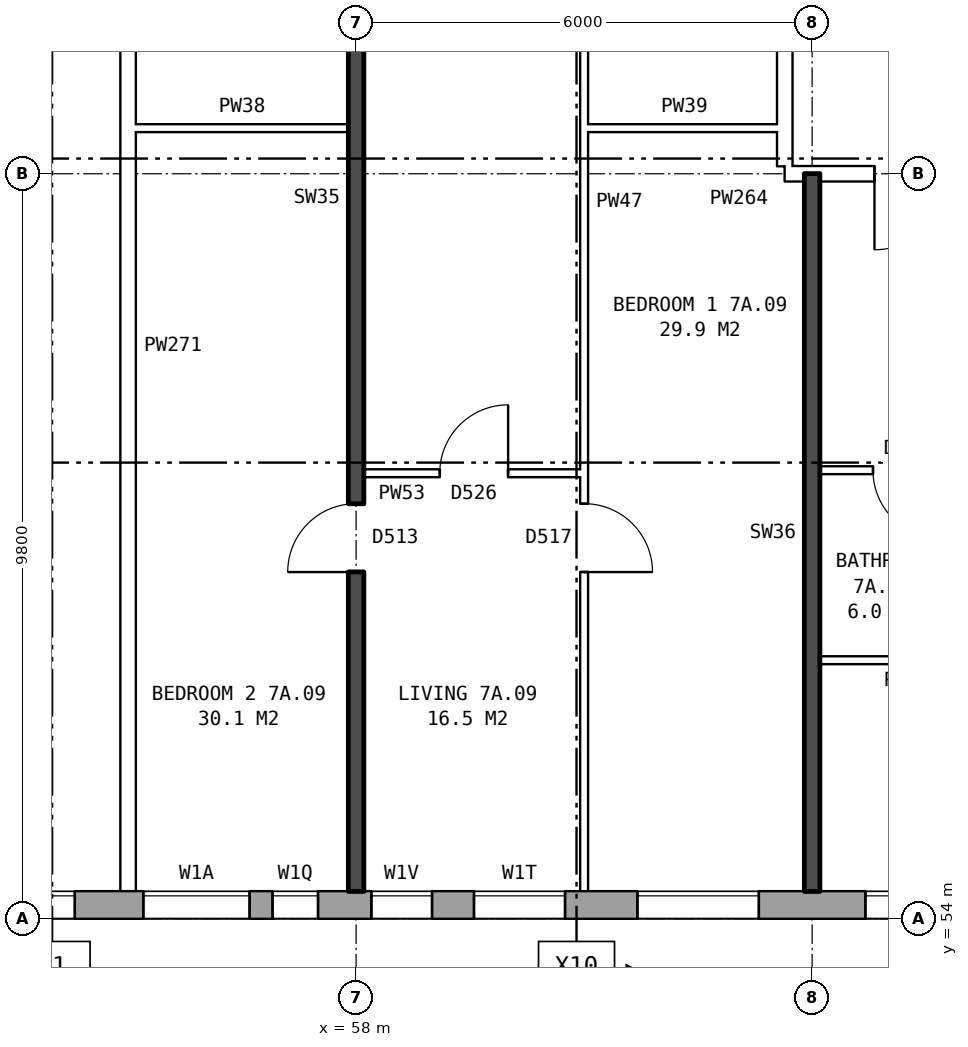
"""IFC4 building model, lengths in metres.
Left out: names, types, materials, properties, quantities, classifications, styles, units other than length and angle.
Written with IfcOpenShell. Run it as: python <this file> out.ifc"""

import sys

from ifc_helpers import new_model, si_unit, direction, frame, frame_2d, origin, place, context, subcontext, project, spatial, rectangle, extrude, element, fill, save


model = new_model("IFC4")
c1 = context("Model", 3, precision=1e-05, world=origin(), true_north=direction((0.0, 1.0)))
c2 = subcontext(c1, "Body", "Model", "MODEL_VIEW")
j1 = project(units=[si_unit("LENGTHUNIT", "METRE"), si_unit("PLANEANGLEUNIT", "RADIAN")], contexts=[c1])
p1 = place(None, origin())
s1 = spatial("IfcSite", under=j1, at=p1, CompositionType="ELEMENT")
p2 = place(p1, origin())
s2 = spatial("IfcBuilding", under=s1, at=p2, CompositionType="ELEMENT")
p3 = place(p2, frame((0.0, 0.0, 28.8)))
s3 = spatial("IfcBuildingStorey", under=s2, at=p3, CompositionType="ELEMENT", Elevation=28.8)
p4 = place(p3, frame((22.825, 54.18, 0.0), z_axis=(0.0, 0.0, 1.0), x_axis=(1.0, 0.0, 0.0)))
e1 = element("IfcWall", 1, at=p4, inside=s3, PredefinedType="STANDARD", context=c2, shape_type="SweptSolid", body=[
    extrude(rectangle(XDim=50.101, YDim=0.36, at=frame_2d((25.05, 0.0))), origin(), (0.0, 0.0, 1.0), 2.85),
])
p5 = place(p4, frame((2.875, 0.0, 0.8)))
e2 = element("IfcOpeningElement", 2, at=p5, cuts=e1, PredefinedType="OPENING", context=c2, shape_type="SweptSolid", body=[
    extrude(rectangle(XDim=1.6, YDim=1.8, at=frame_2d((0.8, 0.9))), frame((0.0, 0.19, 0.0), z_axis=(0.0, -1.0, 0.0), x_axis=(1.0, 0.0, 0.0)), (0.0, 0.0, 1.0), 0.38),
])
p6 = place(p4, frame((5.875, 0.0, 0.8)))
e3 = element("IfcOpeningElement", 3, at=p6, cuts=e1, PredefinedType="OPENING", context=c2, shape_type="SweptSolid", body=[
    extrude(rectangle(XDim=1.6, YDim=1.8, at=frame_2d((0.8, 0.9))), frame((0.0, 0.19, 0.0), z_axis=(0.0, -1.0, 0.0), x_axis=(1.0, 0.0, 0.0)), (0.0, 0.0, 1.0), 0.38),
])
p7 = place(p4, frame((8.875, 0.0, 0.8)))
e4 = element("IfcOpeningElement", 4, at=p7, cuts=e1, PredefinedType="OPENING", context=c2, shape_type="SweptSolid", body=[
    extrude(rectangle(XDim=1.6, YDim=1.8, at=frame_2d((0.8, 0.9))), frame((0.0, 0.19, 0.0), z_axis=(0.0, -1.0, 0.0), x_axis=(1.0, 0.0, 0.0)), (0.0, 0.0, 1.0), 0.38),
])
p8 = place(p4, frame((11.375, 0.0, 1.0)))
e5 = element("IfcOpeningElement", 5, at=p8, cuts=e1, PredefinedType="OPENING", context=c2, shape_type="SweptSolid", body=[
    extrude(rectangle(XDim=1.0, YDim=1.5, at=frame_2d((0.5, 0.75))), frame((0.0, 0.19, 0.0), z_axis=(0.0, -1.0, 0.0), x_axis=(1.0, 0.0, 0.0)), (0.0, 0.0, 1.0), 0.38),
])
p9 = place(p4, frame((12.675, 0.0, 1.6)))
e6 = element("IfcOpeningElement", 6, at=p9, cuts=e1, PredefinedType="OPENING", context=c2, shape_type="SweptSolid", body=[
    extrude(rectangle(XDim=0.6, YDim=0.9, at=frame_2d((0.3, 0.45))), frame((0.0, 0.19, 0.0), z_axis=(0.0, -1.0, 0.0), x_axis=(1.0, 0.0, 0.0)), (0.0, 0.0, 1.0), 0.38),
])
p10 = place(p4, frame((17.875, 0.0, 0.8)))
e7 = element("IfcOpeningElement", 7, at=p10, cuts=e1, PredefinedType="OPENING", context=c2, shape_type="SweptSolid", body=[
    extrude(rectangle(XDim=1.6, YDim=1.8, at=frame_2d((0.8, 0.9))), frame((0.0, 0.19, 0.0), z_axis=(0.0, -1.0, 0.0), x_axis=(1.0, 0.0, 0.0)), (0.0, 0.0, 1.0), 0.38),
])
p11 = place(p4, frame((20.875, 0.0, 0.8)))
e8 = element("IfcOpeningElement", 8, at=p11, cuts=e1, PredefinedType="OPENING", context=c2, shape_type="SweptSolid", body=[
    extrude(rectangle(XDim=1.6, YDim=1.8, at=frame_2d((0.8, 0.9))), frame((0.0, 0.19, 0.0), z_axis=(0.0, -1.0, 0.0), x_axis=(1.0, 0.0, 0.0)), (0.0, 0.0, 1.0), 0.38),
])
p12 = place(p4, frame((23.875, 0.0, 0.8)))
e9 = element("IfcOpeningElement", 9, at=p12, cuts=e1, PredefinedType="OPENING", context=c2, shape_type="SweptSolid", body=[
    extrude(rectangle(XDim=1.6, YDim=1.8, at=frame_2d((0.8, 0.9))), frame((0.0, 0.19, 0.0), z_axis=(0.0, -1.0, 0.0), x_axis=(1.0, 0.0, 0.0)), (0.0, 0.0, 1.0), 0.38),
])
p13 = place(p4, frame((26.875, 0.0, 0.8)))
e10 = element("IfcOpeningElement", 10, at=p13, cuts=e1, PredefinedType="OPENING", context=c2, shape_type="SweptSolid", body=[
    extrude(rectangle(XDim=1.6, YDim=1.8, at=frame_2d((0.8, 0.9))), frame((0.0, 0.19, 0.0), z_axis=(0.0, -1.0, 0.0), x_axis=(1.0, 0.0, 0.0)), (0.0, 0.0, 1.0), 0.38),
])
p14 = place(p4, frame((29.875, 0.0, 0.8)))
e11 = element("IfcOpeningElement", 11, at=p14, cuts=e1, PredefinedType="OPENING", context=c2, shape_type="SweptSolid", body=[
    extrude(rectangle(XDim=1.6, YDim=1.8, at=frame_2d((0.8, 0.9))), frame((0.0, 0.19, 0.0), z_axis=(0.0, -1.0, 0.0), x_axis=(1.0, 0.0, 0.0)), (0.0, 0.0, 1.0), 0.38),
])
p15 = place(p4, frame((32.375, 0.0, 0.8)))
e12 = element("IfcOpeningElement", 12, at=p15, cuts=e1, PredefinedType="OPENING", context=c2, shape_type="SweptSolid", body=[
    extrude(rectangle(XDim=1.4, YDim=1.8, at=frame_2d((0.7, 0.9))), frame((0.0, 0.19, 0.0), z_axis=(0.0, -1.0, 0.0), x_axis=(1.0, 0.0, 0.0)), (0.0, 0.0, 1.0), 0.38),
])
p16 = place(p4, frame((35.375, 0.0, 0.15)))
e13 = element("IfcOpeningElement", 13, at=p16, cuts=e1, PredefinedType="OPENING", context=c2, shape_type="SweptSolid", body=[
    extrude(rectangle(XDim=0.8, YDim=0.9, at=frame_2d((0.4, 0.45))), frame((0.0, 0.19, 0.0), z_axis=(0.0, -1.0, 0.0), x_axis=(1.0, 0.0, 0.0)), (0.0, 0.0, 1.0), 0.38),
])
p17 = place(p4, frame((38.875, 0.0, 0.8)))
e14 = element("IfcOpeningElement", 14, at=p17, cuts=e1, PredefinedType="OPENING", context=c2, shape_type="SweptSolid", body=[
    extrude(rectangle(XDim=1.6, YDim=1.8, at=frame_2d((0.8, 0.9))), frame((0.0, 0.19, 0.0), z_axis=(0.0, -1.0, 0.0), x_axis=(1.0, 0.0, 0.0)), (0.0, 0.0, 1.0), 0.38),
])
p18 = place(p4, frame((41.875, 0.0, 0.8)))
e15 = element("IfcOpeningElement", 15, at=p18, cuts=e1, PredefinedType="OPENING", context=c2, shape_type="SweptSolid", body=[
    extrude(rectangle(XDim=1.6, YDim=1.8, at=frame_2d((0.8, 0.9))), frame((0.0, 0.19, 0.0), z_axis=(0.0, -1.0, 0.0), x_axis=(1.0, 0.0, 0.0)), (0.0, 0.0, 1.0), 0.38),
])
p19 = place(p4, frame((44.875, 0.0, 0.8)))
e16 = element("IfcOpeningElement", 16, at=p19, cuts=e1, PredefinedType="OPENING", context=c2, shape_type="SweptSolid", body=[
    extrude(rectangle(XDim=1.6, YDim=1.8, at=frame_2d((0.8, 0.9))), frame((0.0, 0.19, 0.0), z_axis=(0.0, -1.0, 0.0), x_axis=(1.0, 0.0, 0.0)), (0.0, 0.0, 1.0), 0.38),
])
p20 = place(p4, frame((47.875, 0.0, 0.8)))
e17 = element("IfcOpeningElement", 17, at=p20, cuts=e1, PredefinedType="OPENING", context=c2, shape_type="SweptSolid", body=[
    extrude(rectangle(XDim=1.6, YDim=1.8, at=frame_2d((0.8, 0.9))), frame((0.0, 0.19, 0.0), z_axis=(0.0, -1.0, 0.0), x_axis=(1.0, 0.0, 0.0)), (0.0, 0.0, 1.0), 0.38),
])
p21 = place(p4, frame((14.825, 0.0, 0.8)))
e18 = element("IfcOpeningElement", 18, at=p21, cuts=e1, PredefinedType="OPENING", context=c2, shape_type="SweptSolid", body=[
    extrude(rectangle(XDim=0.6, YDim=0.9, at=frame_2d((0.3, 0.45))), frame((0.0, 0.19, 0.0), z_axis=(0.0, -1.0, 0.0), x_axis=(1.0, 0.0, 0.0)), (0.0, 0.0, 1.0), 0.38),
])
p22 = place(p4, frame((15.775, 0.0, 0.8)))
e19 = element("IfcOpeningElement", 19, at=p22, cuts=e1, PredefinedType="OPENING", context=c2, shape_type="SweptSolid", body=[
    extrude(rectangle(XDim=1.2, YDim=1.5, at=frame_2d((0.6, 0.75))), frame((0.0, 0.19, 0.0), z_axis=(0.0, -1.0, 0.0), x_axis=(1.0, 0.0, 0.0)), (0.0, 0.0, 1.0), 0.38),
])
p23 = place(p4, frame((34.075, 0.0, 0.8)))
e20 = element("IfcOpeningElement", 20, at=p23, cuts=e1, PredefinedType="OPENING", context=c2, shape_type="SweptSolid", body=[
    extrude(rectangle(XDim=0.6, YDim=1.2, at=frame_2d((0.3, 0.6))), frame((0.0, 0.19, 0.0), z_axis=(0.0, -1.0, 0.0), x_axis=(1.0, 0.0, 0.0)), (0.0, 0.0, 1.0), 0.38),
])
p24 = place(p4, frame((36.725, 0.0, 1.65)))
e21 = element("IfcOpeningElement", 21, at=p24, cuts=e1, PredefinedType="OPENING", context=c2, shape_type="SweptSolid", body=[
    extrude(rectangle(XDim=1.2, YDim=0.9, at=frame_2d((0.6, 0.45))), frame((0.0, 0.19, 0.0), z_axis=(0.0, -1.0, 0.0), x_axis=(1.0, 0.0, 0.0)), (0.0, 0.0, 1.0), 0.38),
])
p25 = place(p3, frame((63.64, 63.9, 0.0), z_axis=(0.0, 0.0, 1.0), x_axis=(0.0, 1.0, 0.0)))
e22 = element("IfcWall", 22, at=p25, inside=s3, PredefinedType="PARTITIONING", context=c2, shape_type="SweptSolid", body=[
    extrude(rectangle(XDim=12.2, YDim=0.2, at=frame_2d((6.1, 0.0))), origin(), (0.0, 0.0, 1.0), 2.85),
])
p26 = place(p25, frame((5.1, 0.0, 0.0)))
e23 = element("IfcOpeningElement", 23, at=p26, cuts=e22, PredefinedType="OPENING", context=c2, shape_type="SweptSolid", body=[
    extrude(rectangle(XDim=2.0, YDim=2.1, at=frame_2d((1.0, 1.05))), frame((0.0, 0.11, 0.0), z_axis=(0.0, -1.0, 0.0), x_axis=(1.0, 0.0, 0.0)), (0.0, 0.0, 1.0), 0.22),
])
p27 = place(p3, frame((64.1, 57.4, 0.0), z_axis=(0.0, 0.0, 1.0), x_axis=(1.0, 0.0, 0.0)))
e24 = element("IfcWall", 24, at=p27, inside=s3, PredefinedType="PARTITIONING", context=c2, shape_type="SweptSolid", body=[
    extrude(rectangle(XDim=2.3, YDim=0.1, at=frame_2d((1.15, 0.0))), origin(), (0.0, 0.0, 1.0), 2.85),
])
p28 = place(p3, frame((58.1, 59.86, 0.0), z_axis=(0.0, 0.0, 1.0), x_axis=(1.0, 0.0, 0.0)))
e25 = element("IfcWall", 25, at=p28, inside=s3, PredefinedType="PARTITIONING", context=c2, shape_type="SweptSolid", body=[
    extrude(rectangle(XDim=2.9, YDim=0.1, at=frame_2d((1.45, 0.0))), origin(), (0.0, 0.0, 1.0), 2.85),
])
p29 = place(p28, frame((1.0, 0.0, 0.0)))
e26 = element("IfcOpeningElement", 26, at=p29, cuts=e25, PredefinedType="OPENING", context=c2, shape_type="SweptSolid", body=[
    extrude(rectangle(XDim=0.9, YDim=2.1, at=frame_2d((0.45, 1.05))), frame((0.0, 0.06, 0.0), z_axis=(0.0, -1.0, 0.0), x_axis=(1.0, 0.0, 0.0)), (0.0, 0.0, 1.0), 0.12),
])
p30 = place(p3, frame((64.1, 59.9, 0.0), z_axis=(0.0, 0.0, 1.0), x_axis=(1.0, 0.0, 0.0)))
e27 = element("IfcWall", 27, at=p30, inside=s3, PredefinedType="PARTITIONING", context=c2, shape_type="SweptSolid", body=[
    extrude(rectangle(XDim=5.8, YDim=0.1, at=frame_2d((2.9, 0.0))), origin(), (0.0, 0.0, 1.0), 2.85),
])
p31 = place(p30, frame((3.6, 0.0, 0.0)))
e28 = element("IfcOpeningElement", 28, at=p31, cuts=e27, PredefinedType="OPENING", context=c2, shape_type="SweptSolid", body=[
    extrude(rectangle(XDim=0.9, YDim=2.1, at=frame_2d((0.45, 1.05))), frame((0.0, 0.06, 0.0), z_axis=(0.0, -1.0, 0.0), x_axis=(1.0, 0.0, 0.0)), (0.0, 0.0, 1.0), 0.12),
])
p32 = place(p30, frame((0.7, 0.0, 0.0)))
e29 = element("IfcOpeningElement", 29, at=p32, cuts=e27, PredefinedType="OPENING", context=c2, shape_type="SweptSolid", body=[
    extrude(rectangle(XDim=0.9, YDim=2.1, at=frame_2d((0.45, 1.05))), frame((0.0, 0.06, 0.0), z_axis=(0.0, -1.0, 0.0), x_axis=(1.0, 0.0, 0.0)), (0.0, 0.0, 1.0), 0.12),
])
p33 = place(p3, frame((63.64, 63.8, 0.0), z_axis=(0.0, 0.0, 1.0), x_axis=(1.0, 0.0, 0.0)))
e30 = element("IfcWall", 30, at=p33, inside=s3, PredefinedType="PARTITIONING", context=c2, shape_type="SweptSolid", body=[
    extrude(rectangle(XDim=3.0, YDim=0.2, at=frame_2d((1.5, 0.0))), origin(), (0.0, 0.0, 1.0), 2.85),
])
p34 = place(p33, frame((1.18, 0.0, 0.0)))
e31 = element("IfcOpeningElement", 31, at=p34, cuts=e30, PredefinedType="OPENING", context=c2, shape_type="SweptSolid", body=[
    extrude(rectangle(XDim=1.0, YDim=2.1, at=frame_2d((0.5, 1.05))), frame((0.0, 0.11, 0.0), z_axis=(0.0, -1.0, 0.0), x_axis=(1.0, 0.0, 0.0)), (0.0, 0.0, 1.0), 0.22),
])
p35 = place(p3, frame((55.1, 64.4, 0.0), z_axis=(0.0, 0.0, 1.0), x_axis=(1.0, 0.0, 0.0)))
e32 = element("IfcWall", 32, at=p35, inside=s3, PredefinedType="PARTITIONING", context=c2, shape_type="SweptSolid", body=[
    extrude(rectangle(XDim=2.8, YDim=0.1, at=frame_2d((1.4, 0.0))), origin(), (0.0, 0.0, 1.0), 2.85),
])
p36 = place(p3, frame((61.0, 64.4, 0.0), z_axis=(0.0, 0.0, 1.0), x_axis=(1.0, 0.0, 0.0)))
e33 = element("IfcWall", 33, at=p36, inside=s3, PredefinedType="PARTITIONING", context=c2, shape_type="SweptSolid", body=[
    extrude(rectangle(XDim=2.64, YDim=0.1, at=frame_2d((1.32, 0.0))), origin(), (0.0, 0.0, 1.0), 2.85),
])
p37 = place(p3, frame((55.0, 54.36, 0.0), z_axis=(0.0, 0.0, 1.0), x_axis=(0.0, 1.0, 0.0)))
e34 = element("IfcWall", 34, at=p37, inside=s3, PredefinedType="PARTITIONING", context=c2, shape_type="SweptSolid", body=[
    extrude(rectangle(XDim=14.34, YDim=0.2, at=frame_2d((7.17, 0.0))), origin(), (0.0, 0.0, 1.0), 2.85),
])
p38 = place(p3, frame((58.0, 54.36, 0.0), z_axis=(0.0, 0.0, 1.0), x_axis=(0.0, 1.0, 0.0)))
e35 = element("IfcWall", 35, at=p38, inside=s3, PredefinedType="SOLIDWALL", context=c2, shape_type="SweptSolid", body=[
    extrude(rectangle(XDim=14.44, YDim=0.2, at=frame_2d((7.22, 0.0))), origin(), (0.0, 0.0, 1.0), 2.85),
])
p39 = place(p38, frame((4.2, 0.0, 0.0)))
e36 = element("IfcOpeningElement", 36, at=p39, cuts=e35, PredefinedType="OPENING", context=c2, shape_type="SweptSolid", body=[
    extrude(rectangle(XDim=0.9, YDim=2.1, at=frame_2d((0.45, 1.05))), frame((0.0, 0.11, 0.0), z_axis=(0.0, -1.0, 0.0), x_axis=(1.0, 0.0, 0.0)), (0.0, 0.0, 1.0), 0.22),
])
p40 = place(p38, frame((13.14, 0.0, 0.0)))
e37 = element("IfcOpeningElement", 37, at=p40, cuts=e35, PredefinedType="OPENING", context=c2, shape_type="SweptSolid", body=[
    extrude(rectangle(XDim=0.9, YDim=2.1, at=frame_2d((0.45, 1.05))), frame((0.0, 0.11, 0.0), z_axis=(0.0, -1.0, 0.0), x_axis=(1.0, 0.0, 0.0)), (0.0, 0.0, 1.0), 0.22),
])
p41 = place(p3, frame((61.0, 54.36, 0.0), z_axis=(0.0, 0.0, 1.0), x_axis=(0.0, 1.0, 0.0)))
e38 = element("IfcWall", 38, at=p41, inside=s3, PredefinedType="PARTITIONING", context=c2, shape_type="SweptSolid", body=[
    extrude(rectangle(XDim=14.34, YDim=0.1, at=frame_2d((7.17, 0.0))), origin(), (0.0, 0.0, 1.0), 2.85),
])
p42 = place(p41, frame((4.2, 0.0, 0.0)))
e39 = element("IfcOpeningElement", 39, at=p42, cuts=e38, PredefinedType="OPENING", context=c2, shape_type="SweptSolid", body=[
    extrude(rectangle(XDim=0.9, YDim=2.1, at=frame_2d((0.45, 1.05))), frame((0.0, 0.06, 0.0), z_axis=(0.0, -1.0, 0.0), x_axis=(1.0, 0.0, 0.0)), (0.0, 0.0, 1.0), 0.12),
])
p43 = place(p41, frame((13.04, 0.0, 0.0)))
e40 = element("IfcOpeningElement", 40, at=p43, cuts=e38, PredefinedType="OPENING", context=c2, shape_type="SweptSolid", body=[
    extrude(rectangle(XDim=0.9, YDim=2.1, at=frame_2d((0.45, 1.05))), frame((0.0, 0.06, 0.0), z_axis=(0.0, -1.0, 0.0), x_axis=(1.0, 0.0, 0.0)), (0.0, 0.0, 1.0), 0.12),
])
p44 = place(p3, frame((64.0, 54.36, 0.0), z_axis=(0.0, 0.0, 1.0), x_axis=(0.0, 1.0, 0.0)))
e41 = element("IfcWall", 41, at=p44, inside=s3, PredefinedType="SOLIDWALL", context=c2, shape_type="SweptSolid", body=[
    extrude(rectangle(XDim=9.44, YDim=0.2, at=frame_2d((4.72, 0.0))), origin(), (0.0, 0.0, 1.0), 2.85),
])
p45 = place(p14, origin())
e42 = element("IfcWindow", 42, at=p45, inside=s3, PartitioningType="SINGLE_PANEL", PredefinedType="WINDOW", context=c2, shape_type="SweptSolid", body=[
    extrude(rectangle(XDim=1.6, YDim=1.8, at=frame_2d((0.8, 0.9))), frame((0.0, 0.15, 0.0), z_axis=(0.0, -1.0, 0.0), x_axis=(1.0, 0.0, 0.0)), (0.0, 0.0, 1.0), 0.06),
])
fill(e11, e42)
p46 = place(p15, origin())
e43 = element("IfcWindow", 43, at=p46, inside=s3, PartitioningType="SINGLE_PANEL", PredefinedType="WINDOW", context=c2, shape_type="SweptSolid", body=[
    extrude(rectangle(XDim=1.4, YDim=1.8, at=frame_2d((0.7, 0.9))), frame((0.0, 0.15, 0.0), z_axis=(0.0, -1.0, 0.0), x_axis=(1.0, 0.0, 0.0)), (0.0, 0.0, 1.0), 0.06),
])
fill(e12, e43)
p47 = place(p16, origin())
e44 = element("IfcWindow", 44, at=p47, inside=s3, PartitioningType="SINGLE_PANEL", PredefinedType="WINDOW", context=c2, shape_type="SweptSolid", body=[
    extrude(rectangle(XDim=0.8, YDim=0.9, at=frame_2d((0.4, 0.45))), frame((0.0, 0.15, 0.0), z_axis=(0.0, -1.0, 0.0), x_axis=(1.0, 0.0, 0.0)), (0.0, 0.0, 1.0), 0.06),
])
fill(e13, e44)
p48 = place(p17, origin())
e45 = element("IfcWindow", 45, at=p48, inside=s3, PartitioningType="SINGLE_PANEL", PredefinedType="WINDOW", context=c2, shape_type="SweptSolid", body=[
    extrude(rectangle(XDim=1.6, YDim=1.8, at=frame_2d((0.8, 0.9))), frame((0.0, 0.15, 0.0), z_axis=(0.0, -1.0, 0.0), x_axis=(1.0, 0.0, 0.0)), (0.0, 0.0, 1.0), 0.06),
])
fill(e14, e45)
p49 = place(p18, origin())
e46 = element("IfcWindow", 46, at=p49, inside=s3, PartitioningType="SINGLE_PANEL", PredefinedType="WINDOW", context=c2, shape_type="SweptSolid", body=[
    extrude(rectangle(XDim=1.6, YDim=1.8, at=frame_2d((0.8, 0.9))), frame((0.0, 0.15, 0.0), z_axis=(0.0, -1.0, 0.0), x_axis=(1.0, 0.0, 0.0)), (0.0, 0.0, 1.0), 0.06),
])
fill(e15, e46)
p50 = place(p34, frame((1.0, 0.0, 0.0), z_axis=(0.0, 0.0, 1.0), x_axis=(-1.0, 0.0, 0.0)))
e47 = element("IfcDoor", 47, at=p50, inside=s3, OperationType="SINGLE_SWING_RIGHT", PredefinedType="DOOR", context=c2, shape_type="SweptSolid", body=[
    extrude(rectangle(XDim=1.0, YDim=2.1, at=frame_2d((0.5, 1.05))), frame((0.0, 0.025, 0.0), z_axis=(0.0, -1.0, 0.0), x_axis=(1.0, 0.0, 0.0)), (0.0, 0.0, 1.0), 0.05),
])
fill(e31, e47)
p51 = place(p32, frame((0.9, 0.0, 0.0), z_axis=(0.0, 0.0, 1.0), x_axis=(-1.0, 0.0, 0.0)))
e48 = element("IfcDoor", 48, at=p51, inside=s3, OperationType="SINGLE_SWING_LEFT", PredefinedType="DOOR", context=c2, shape_type="SweptSolid", body=[
    extrude(rectangle(XDim=0.9, YDim=2.1, at=frame_2d((0.45, 1.05))), frame((0.0, 0.025, 0.0), z_axis=(0.0, -1.0, 0.0), x_axis=(1.0, 0.0, 0.0)), (0.0, 0.0, 1.0), 0.05),
])
fill(e29, e48)
p52 = place(p42, frame((0.9, 0.0, 0.0), z_axis=(0.0, 0.0, 1.0), x_axis=(-1.0, 0.0, 0.0)))
e49 = element("IfcDoor", 49, at=p52, inside=s3, OperationType="SINGLE_SWING_RIGHT", PredefinedType="DOOR", context=c2, shape_type="SweptSolid", body=[
    extrude(rectangle(XDim=0.9, YDim=2.1, at=frame_2d((0.45, 1.05))), frame((0.0, 0.025, 0.0), z_axis=(0.0, -1.0, 0.0), x_axis=(1.0, 0.0, 0.0)), (0.0, 0.0, 1.0), 0.05),
])
fill(e39, e49)
p53 = place(p39, origin())
e50 = element("IfcDoor", 50, at=p53, inside=s3, OperationType="SINGLE_SWING_LEFT", PredefinedType="DOOR", context=c2, shape_type="SweptSolid", body=[
    extrude(rectangle(XDim=0.9, YDim=2.1, at=frame_2d((0.45, 1.05))), frame((0.0, 0.025, 0.0), z_axis=(0.0, -1.0, 0.0), x_axis=(1.0, 0.0, 0.0)), (0.0, 0.0, 1.0), 0.05),
])
fill(e36, e50)
p54 = place(p29, origin())
e51 = element("IfcDoor", 51, at=p54, inside=s3, OperationType="SINGLE_SWING_RIGHT", PredefinedType="DOOR", context=c2, shape_type="SweptSolid", body=[
    extrude(rectangle(XDim=0.9, YDim=2.1, at=frame_2d((0.45, 1.05))), frame((0.0, 0.025, 0.0), z_axis=(0.0, -1.0, 0.0), x_axis=(1.0, 0.0, 0.0)), (0.0, 0.0, 1.0), 0.05),
])
fill(e26, e51)
p55 = place(p23, origin())
e52 = element("IfcWindow", 52, at=p55, inside=s3, PartitioningType="SINGLE_PANEL", PredefinedType="WINDOW", context=c2, shape_type="SweptSolid", body=[
    extrude(rectangle(XDim=0.6, YDim=1.2, at=frame_2d((0.3, 0.6))), frame((0.0, 0.15, 0.0), z_axis=(0.0, -1.0, 0.0), x_axis=(1.0, 0.0, 0.0)), (0.0, 0.0, 1.0), 0.06),
])
fill(e20, e52)
p56 = place(p24, origin())
e53 = element("IfcWindow", 53, at=p56, inside=s3, PartitioningType="SINGLE_PANEL", PredefinedType="WINDOW", context=c2, shape_type="SweptSolid", body=[
    extrude(rectangle(XDim=1.2, YDim=0.9, at=frame_2d((0.6, 0.45))), frame((0.0, 0.15, 0.0), z_axis=(0.0, -1.0, 0.0), x_axis=(1.0, 0.0, 0.0)), (0.0, 0.0, 1.0), 0.06),
])
fill(e21, e53)
save(model, sys.argv[1])
